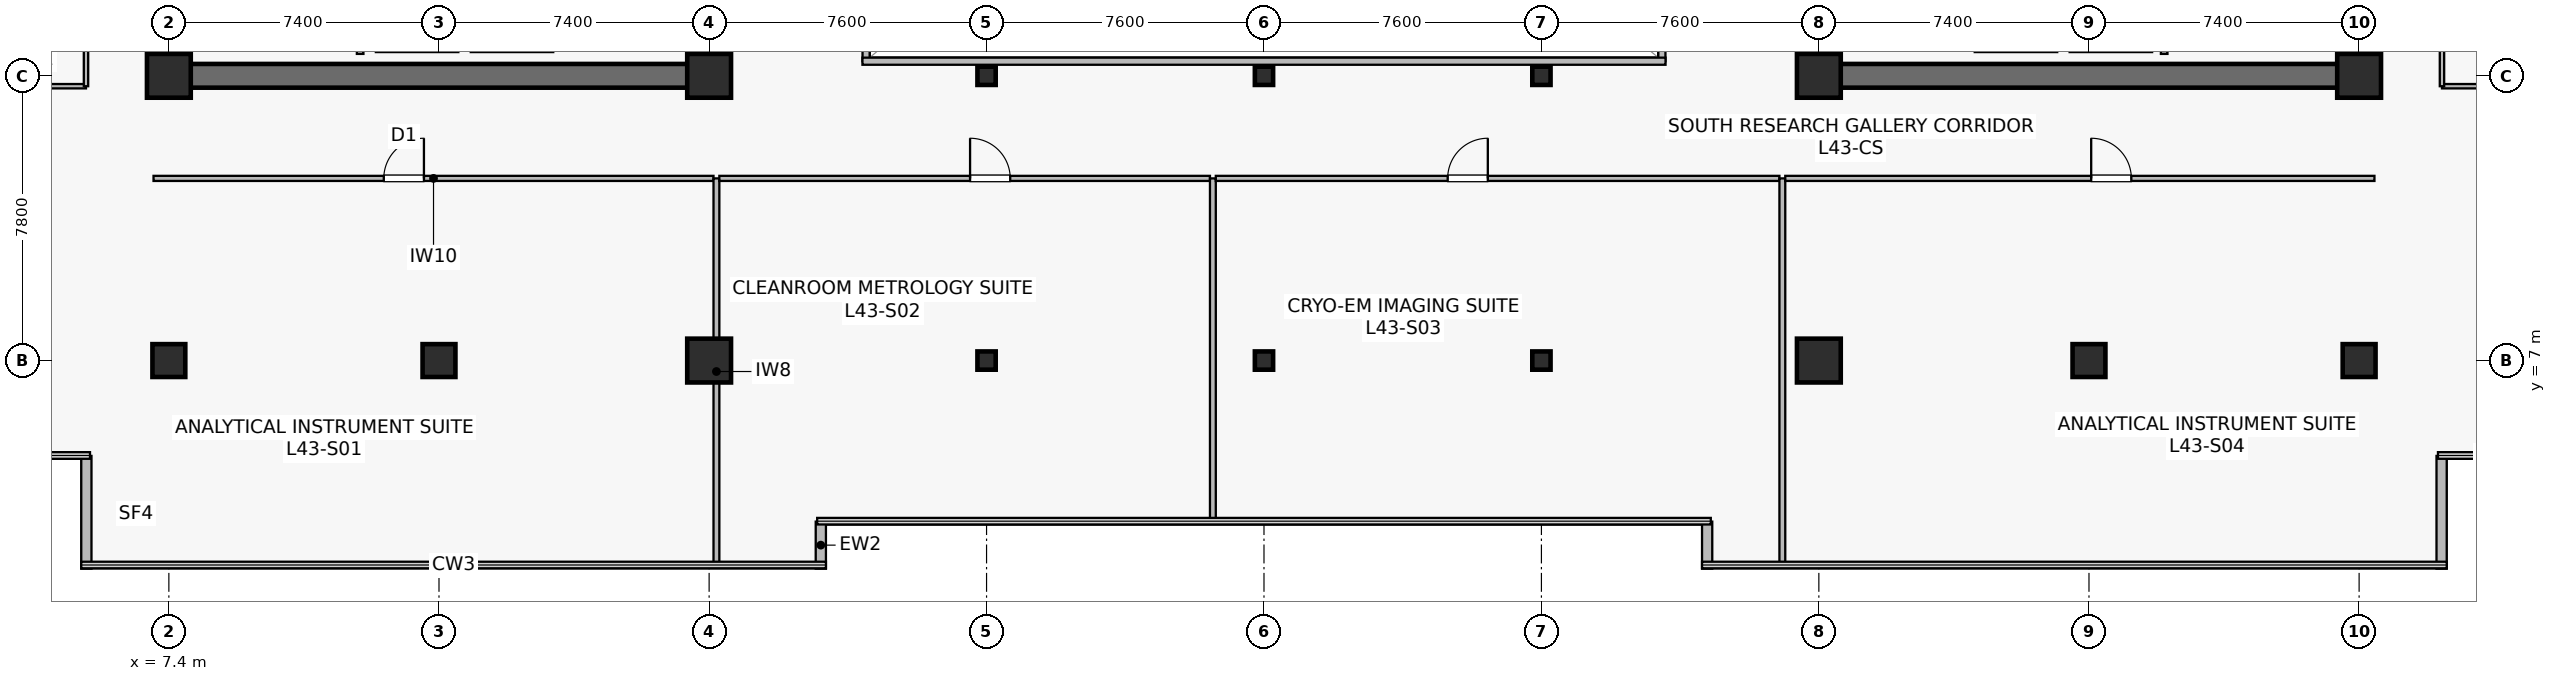
"""IFC4 building model, lengths in metres.
Left out: names, types, materials, properties, quantities, classifications, styles, units other than length and angle.
Written with IfcOpenShell. Run it as: python <this file> out.ifc"""

import sys

from ifc_helpers import new_model, si_unit, direction, frame, frame_2d, origin, origin_2d, place, context, subcontext, project, spatial, rectangle, hollow_rectangle, extrude, source, transform, mapped, element, fill, save


model = new_model("IFC4")
c1 = context("Model", 3, precision=1e-05, world=origin(), true_north=direction((0.0, 1.0)))
c2 = subcontext(c1, "Body", "Model", "MODEL_VIEW")
j1 = project(units=[si_unit("LENGTHUNIT", "METRE"), si_unit("PLANEANGLEUNIT", "RADIAN")], contexts=[c1])
p1 = place(None, origin())
s1 = spatial("IfcSite", under=j1, at=p1, CompositionType="ELEMENT")
p2 = place(p1, origin())
s2 = spatial("IfcBuilding", under=s1, at=p2, CompositionType="ELEMENT")
p3 = place(p2, frame((0.0, 0.0, 178.9)))
s3 = spatial("IfcBuildingStorey", under=s2, at=p3, CompositionType="ELEMENT", Elevation=178.9)
p4 = place(p3, frame((7.075, 14.8, 0.0), z_axis=(0.0, 0.0, 1.0), x_axis=(1.0, 0.0, 0.0)))
e1 = element("IfcWall", 1, at=p4, inside=s3, PredefinedType="SHEAR", context=c2, shape_type="SweptSolid", body=[
    extrude(rectangle(XDim=15.45, YDim=0.65, at=frame_2d((7.725, 0.0))), origin(), (0.0, 0.0, 1.0), 3.79),
])
p5 = place(p3, frame((7.4, 15.125, 0.0), z_axis=(0.0, 0.0, 1.0), x_axis=(0.0, 1.0, 0.0)))
e2 = element("IfcWall", 2, at=p5, inside=s3, PredefinedType="SHEAR", context=c2, shape_type="SweptSolid", body=[
    extrude(rectangle(XDim=18.35, YDim=0.65, at=frame_2d((9.175, 0.0))), origin(), (0.0, 0.0, 1.0), 3.79),
])
p6 = place(p3, frame((22.2, 15.125, 0.0), z_axis=(0.0, 0.0, 1.0), x_axis=(0.0, 1.0, 0.0)))
e3 = element("IfcWall", 3, at=p6, inside=s3, PredefinedType="SHEAR", context=c2, shape_type="SweptSolid", body=[
    extrude(rectangle(XDim=18.35, YDim=0.65, at=frame_2d((9.175, 0.0))), origin(), (0.0, 0.0, 1.0), 3.79),
])
p7 = place(p6, frame((3.425, 0.0, 0.0)))
e4 = element("IfcOpeningElement", 4, at=p7, cuts=e3, PredefinedType="OPENING", context=c2, shape_type="SweptSolid", body=[
    extrude(rectangle(XDim=1.42, YDim=2.2, at=frame_2d((0.71, 1.1))), frame((0.0, 0.335, 0.0), z_axis=(0.0, -1.0, 0.0), x_axis=(1.0, 0.0, 0.0)), (0.0, 0.0, 1.0), 0.67),
])
p8 = place(p3, frame((52.275, 14.8, 0.0), z_axis=(0.0, 0.0, 1.0), x_axis=(1.0, 0.0, 0.0)))
e5 = element("IfcWall", 5, at=p8, inside=s3, PredefinedType="SHEAR", context=c2, shape_type="SweptSolid", body=[
    extrude(rectangle(XDim=15.45, YDim=0.65, at=frame_2d((7.725, 0.0))), origin(), (0.0, 0.0, 1.0), 3.79),
])
p9 = place(p3, frame((52.6, 15.125, 0.0), z_axis=(0.0, 0.0, 1.0), x_axis=(0.0, 1.0, 0.0)))
e6 = element("IfcWall", 6, at=p9, inside=s3, PredefinedType="SHEAR", context=c2, shape_type="SweptSolid", body=[
    extrude(rectangle(XDim=18.35, YDim=0.65, at=frame_2d((9.175, 0.0))), origin(), (0.0, 0.0, 1.0), 3.79),
])
p10 = place(p9, frame((3.425, 0.0, 0.0)))
e7 = element("IfcOpeningElement", 7, at=p10, cuts=e6, PredefinedType="OPENING", context=c2, shape_type="SweptSolid", body=[
    extrude(rectangle(XDim=1.42, YDim=2.2, at=frame_2d((0.71, 1.1))), frame((0.0, 0.335, 0.0), z_axis=(0.0, -1.0, 0.0), x_axis=(1.0, 0.0, 0.0)), (0.0, 0.0, 1.0), 0.67),
])
p11 = place(p3, frame((67.4, 15.125, 0.0), z_axis=(0.0, 0.0, 1.0), x_axis=(0.0, 1.0, 0.0)))
e8 = element("IfcWall", 8, at=p11, inside=s3, PredefinedType="SHEAR", context=c2, shape_type="SweptSolid", body=[
    extrude(rectangle(XDim=18.35, YDim=0.65, at=frame_2d((9.175, 0.0))), origin(), (0.0, 0.0, 1.0), 3.79),
])
m1 = source(origin(), c2, "Body", "SweptSolid", [
    extrude(rectangle(XDim=0.9, YDim=0.9, at=origin_2d()), origin(), (0.0, 0.0, 1.0), 4.1),
])
p12 = place(p3, frame((14.8, 7.0, 0.0), z_axis=(0.0, 0.0, 1.0), x_axis=(1.0, 0.0, 0.0)))
e9 = element("IfcColumn", 9, at=p12, inside=s3, PredefinedType="COLUMN", context=c2, shape_type="MappedRepresentation", body=[
    mapped(m1, transform((0.0, 0.0, 0.0), scale=1.0)),
])
m2 = source(origin(), c2, "Body", "SweptSolid", [
    extrude(rectangle(XDim=1.2, YDim=1.2, at=origin_2d()), origin(), (0.0, 0.0, 1.0), 4.1),
])
for number, where, z_axis, x_axis in (
    (10, (22.2, 7.0, 0.0), (0.0, 0.0, 1.0), (1.0, 0.0, 0.0)),
    (11, (7.4, 14.8, 0.0), (0.0, 0.0, 1.0), (1.0, 0.0, 0.0)),
    (12, (22.2, 14.8, 0.0), (0.0, 0.0, 1.0), (1.0, 0.0, 0.0)),
    (13, (52.6, 7.0, 0.0), (0.0, 0.0, 1.0), (1.0, 0.0, 0.0)),
):
    element("IfcColumn", number, at=place(p3, frame(where, z_axis=z_axis, x_axis=x_axis)), inside=s3, PredefinedType="COLUMN", context=c2, shape_type="MappedRepresentation", body=[
        mapped(m2, transform((0.0, 0.0, 0.0), scale=1.0)),
    ])
p13 = place(p3, frame((60.0, 7.0, 0.0), z_axis=(0.0, 0.0, 1.0), x_axis=(1.0, 0.0, 0.0)))
e14 = element("IfcColumn", 14, at=p13, inside=s3, PredefinedType="COLUMN", context=c2, shape_type="MappedRepresentation", body=[
    mapped(m1, transform((0.0, 0.0, 0.0), scale=1.0)),
])
for number, where, z_axis, x_axis in (
    (15, (52.6, 14.8, 0.0), (0.0, 0.0, 1.0), (1.0, 0.0, 0.0)),
    (16, (67.4, 14.8, 0.0), (0.0, 0.0, 1.0), (1.0, 0.0, 0.0)),
):
    element("IfcColumn", number, at=place(p3, frame(where, z_axis=z_axis, x_axis=x_axis)), inside=s3, PredefinedType="COLUMN", context=c2, shape_type="MappedRepresentation", body=[
        mapped(m2, transform((0.0, 0.0, 0.0), scale=1.0)),
    ])
for number, where, z_axis, x_axis in (
    (17, (7.4, 7.0, 0.0), (0.0, 0.0, 1.0), (1.0, 0.0, 0.0)),
    (18, (67.4, 7.0, 0.0), (0.0, 0.0, 1.0), (1.0, 0.0, 0.0)),
):
    element("IfcColumn", number, at=place(p3, frame(where, z_axis=z_axis, x_axis=x_axis)), inside=s3, PredefinedType="COLUMN", context=c2, shape_type="MappedRepresentation", body=[
        mapped(m1, transform((0.0, 0.0, 0.0), scale=1.0)),
    ])
m3 = source(origin(), c2, "Body", "SweptSolid", [
    extrude(hollow_rectangle(XDim=0.5, YDim=0.5, WallThickness=0.022, at=origin_2d()), origin(), (0.0, 0.0, 1.0), 4.1),
])
for number, where, z_axis, x_axis in (
    (19, (29.8, 7.0, 0.0), (0.0, 0.0, 1.0), (1.0, 0.0, 0.0)),
    (20, (29.8, 14.8, 0.0), (0.0, 0.0, 1.0), (1.0, 0.0, 0.0)),
    (21, (37.4, 7.0, 0.0), (0.0, 0.0, 1.0), (1.0, 0.0, 0.0)),
    (22, (37.4, 14.8, 0.0), (0.0, 0.0, 1.0), (1.0, 0.0, 0.0)),
    (23, (45.0, 7.0, 0.0), (0.0, 0.0, 1.0), (1.0, 0.0, 0.0)),
    (24, (45.0, 14.8, 0.0), (0.0, 0.0, 1.0), (1.0, 0.0, 0.0)),
):
    element("IfcColumn", number, at=place(p3, frame(where, z_axis=z_axis, x_axis=x_axis)), inside=s3, PredefinedType="COLUMN", context=c2, shape_type="MappedRepresentation", body=[
        mapped(m3, transform((0.0, 0.0, 0.0), scale=1.0)),
    ])
for number, where, z_axis, x_axis in (
    (25, (25.26, 1.3, 0.0), (0.0, 0.0, 1.0), (0.0, 1.0, 0.0)),
    (26, (49.54, 2.588, 0.0), (0.0, 0.0, 1.0), (0.0, -1.0, 0.0)),
):
    element("IfcWall", number, at=place(p3, frame(where, z_axis=z_axis, x_axis=x_axis)), inside=s3, PredefinedType="STANDARD", context=c2, shape_type="SweptSolid", body=[
        extrude(rectangle(XDim=1.288, YDim=0.28, at=frame_2d((0.644, 0.0))), origin(), (0.0, 0.0, 1.0), 3.79),
    ])
for number, where, z_axis, x_axis in (
    (27, (69.66, 1.3, 0.0), (0.0, 0.0, 1.0), (0.0, 1.0, 0.0)),
    (28, (5.14, 4.388, 0.0), (0.0, 0.0, 1.0), (0.0, -1.0, 0.0)),
):
    element("IfcWall", number, at=place(p3, frame(where, z_axis=z_axis, x_axis=x_axis)), inside=s3, PredefinedType="STANDARD", context=c2, shape_type="SweptSolid", body=[
        extrude(rectangle(XDim=3.088, YDim=0.28, at=frame_2d((1.544, 0.0))), origin(), (0.0, 0.0, 1.0), 3.79),
    ])
p14 = place(p3, frame((13.07, 15.55, 0.0), z_axis=(0.0, 0.0, 1.0), x_axis=(1.0, 0.0, 0.0)))
e29 = element("IfcWall", 29, at=p14, inside=s3, PredefinedType="SOLIDWALL", context=c2, shape_type="SweptSolid", body=[
    extrude(rectangle(XDim=2.26, YDim=0.2, at=frame_2d((1.13, 0.0))), origin(), (0.0, 0.0, 1.0), 3.187),
])
p15 = place(p3, frame((15.67, 15.55, 0.0), z_axis=(0.0, 0.0, 1.0), x_axis=(1.0, 0.0, 0.0)))
e30 = element("IfcWall", 30, at=p15, inside=s3, PredefinedType="SOLIDWALL", context=c2, shape_type="SweptSolid", body=[
    extrude(rectangle(XDim=2.26, YDim=0.2, at=frame_2d((1.13, 0.0))), origin(), (0.0, 0.0, 1.0), 3.79),
])
p16 = place(p3, frame((12.64, 15.4, 0.0), z_axis=(0.0, 0.0, 1.0), x_axis=(0.0, 1.0, 0.0)))
e31 = element("IfcWall", 31, at=p16, inside=s3, PredefinedType="SOLIDWALL", context=c2, shape_type="SweptSolid", body=[
    extrude(rectangle(XDim=2.4, YDim=0.18, at=frame_2d((1.2, 0.0))), origin(), (0.0, 0.0, 1.0), 3.79),
])
p17 = place(p3, frame((59.47, 15.55, 0.0), z_axis=(0.0, 0.0, 1.0), x_axis=(1.0, 0.0, 0.0)))
e32 = element("IfcWall", 32, at=p17, inside=s3, PredefinedType="SOLIDWALL", context=c2, shape_type="SweptSolid", body=[
    extrude(rectangle(XDim=2.26, YDim=0.2, at=frame_2d((1.13, 0.0))), origin(), (0.0, 0.0, 1.0), 3.187),
])
p18 = place(p3, frame((56.87, 15.55, 0.0), z_axis=(0.0, 0.0, 1.0), x_axis=(1.0, 0.0, 0.0)))
e33 = element("IfcWall", 33, at=p18, inside=s3, PredefinedType="SOLIDWALL", context=c2, shape_type="SweptSolid", body=[
    extrude(rectangle(XDim=2.26, YDim=0.2, at=frame_2d((1.13, 0.0))), origin(), (0.0, 0.0, 1.0), 3.79),
])
p19 = place(p3, frame((62.06, 15.4, 0.0), z_axis=(0.0, 0.0, 1.0), x_axis=(0.0, 1.0, 0.0)))
e34 = element("IfcWall", 34, at=p19, inside=s3, PredefinedType="SOLIDWALL", context=c2, shape_type="SweptSolid", body=[
    extrude(rectangle(XDim=2.4, YDim=0.18, at=frame_2d((1.2, 0.0))), origin(), (0.0, 0.0, 1.0), 3.79),
])
p20 = place(p3, frame((26.5, 15.2, 0.0), z_axis=(0.0, 0.0, 1.0), x_axis=(0.0, 1.0, 0.0)))
e35 = element("IfcWall", 35, at=p20, inside=s3, PredefinedType="SOLIDWALL", context=c2, shape_type="SweptSolid", body=[
    extrude(rectangle(XDim=18.2, YDim=0.195, at=frame_2d((9.1, 0.0))), origin(), (0.0, 0.0, 1.0), 3.79),
])
p21 = place(p20, frame((1.8, 0.0, 0.9)))
e36 = element("IfcOpeningElement", 36, at=p21, cuts=e35, PredefinedType="OPENING", context=c2, shape_type="SweptSolid", body=[
    extrude(rectangle(XDim=1.2, YDim=1.35, at=frame_2d((0.6, 0.675))), frame((0.0, 0.107, 0.0), z_axis=(0.0, -1.0, 0.0), x_axis=(1.0, 0.0, 0.0)), (0.0, 0.0, 1.0), 0.215),
])
p22 = place(p20, frame((13.2, 0.0, 0.9)))
e37 = element("IfcOpeningElement", 37, at=p22, cuts=e35, PredefinedType="OPENING", context=c2, shape_type="SweptSolid", body=[
    extrude(rectangle(XDim=1.2, YDim=1.35, at=frame_2d((0.6, 0.675))), frame((0.0, 0.107, 0.0), z_axis=(0.0, -1.0, 0.0), x_axis=(1.0, 0.0, 0.0)), (0.0, 0.0, 1.0), 0.215),
])
p23 = place(p3, frame((48.3, 15.2, 0.0), z_axis=(0.0, 0.0, 1.0), x_axis=(0.0, 1.0, 0.0)))
e38 = element("IfcWall", 38, at=p23, inside=s3, PredefinedType="SOLIDWALL", context=c2, shape_type="SweptSolid", body=[
    extrude(rectangle(XDim=18.2, YDim=0.195, at=frame_2d((9.1, 0.0))), origin(), (0.0, 0.0, 1.0), 3.79),
])
p24 = place(p23, frame((1.8, 0.0, 0.9)))
e39 = element("IfcOpeningElement", 39, at=p24, cuts=e38, PredefinedType="OPENING", context=c2, shape_type="SweptSolid", body=[
    extrude(rectangle(XDim=1.2, YDim=1.35, at=frame_2d((0.6, 0.675))), frame((0.0, 0.107, 0.0), z_axis=(0.0, -1.0, 0.0), x_axis=(1.0, 0.0, 0.0)), (0.0, 0.0, 1.0), 0.215),
])
p25 = place(p23, frame((13.2, 0.0, 0.9)))
e40 = element("IfcOpeningElement", 40, at=p25, cuts=e38, PredefinedType="OPENING", context=c2, shape_type="SweptSolid", body=[
    extrude(rectangle(XDim=1.2, YDim=1.35, at=frame_2d((0.6, 0.675))), frame((0.0, 0.107, 0.0), z_axis=(0.0, -1.0, 0.0), x_axis=(1.0, 0.0, 0.0)), (0.0, 0.0, 1.0), 0.215),
])
p26 = place(p3, frame((26.4, 15.2, 0.0), z_axis=(0.0, 0.0, 1.0), x_axis=(1.0, 0.0, 0.0)))
e41 = element("IfcWall", 41, at=p26, inside=s3, PredefinedType="SOLIDWALL", context=c2, shape_type="SweptSolid", body=[
    extrude(rectangle(XDim=22.0, YDim=0.195, at=frame_2d((11.0, 0.0))), origin(), (0.0, 0.0, 1.0), 3.79),
])
p27 = place(p3, frame((6.98, 11.99, 0.0), z_axis=(0.0, 0.0, 1.0), x_axis=(1.0, 0.0, 0.0)))
e42 = element("IfcWall", 42, at=p27, inside=s3, PredefinedType="PARTITIONING", context=c2, shape_type="SweptSolid", body=[
    extrude(rectangle(XDim=15.34, YDim=0.14, at=frame_2d((7.67, 0.0))), origin(), (0.0, 0.0, 1.0), 3.187),
])
p28 = place(p27, frame((6.308, 0.0, 0.0)))
e43 = element("IfcOpeningElement", 43, at=p28, cuts=e42, PredefinedType="OPENING", context=c2, shape_type="SweptSolid", body=[
    extrude(rectangle(XDim=1.1, YDim=2.18, at=frame_2d((0.55, 1.09))), frame((0.0, 0.08, 0.0), z_axis=(0.0, -1.0, 0.0), x_axis=(1.0, 0.0, 0.0)), (0.0, 0.0, 1.0), 0.16),
])
p29 = place(p3, frame((22.4, 1.41, 0.0), z_axis=(0.0, 0.0, 1.0), x_axis=(0.0, 1.0, 0.0)))
e44 = element("IfcWall", 44, at=p29, inside=s3, PredefinedType="PARTITIONING", context=c2, shape_type="SweptSolid", body=[
    extrude(rectangle(XDim=10.58, YDim=0.16, at=frame_2d((5.29, 0.0))), origin(), (0.0, 0.0, 1.0), 3.075),
])
p30 = place(p3, frame((22.48, 11.99, 0.0), z_axis=(0.0, 0.0, 1.0), x_axis=(1.0, 0.0, 0.0)))
e45 = element("IfcWall", 45, at=p30, inside=s3, PredefinedType="PARTITIONING", context=c2, shape_type="SweptSolid", body=[
    extrude(rectangle(XDim=13.44, YDim=0.14, at=frame_2d((6.72, 0.0))), origin(), (0.0, 0.0, 1.0), 3.187),
])
p31 = place(p30, frame((6.868, 0.0, 0.0)))
e46 = element("IfcOpeningElement", 46, at=p31, cuts=e45, PredefinedType="OPENING", context=c2, shape_type="SweptSolid", body=[
    extrude(rectangle(XDim=1.1, YDim=2.18, at=frame_2d((0.55, 1.09))), frame((0.0, 0.08, 0.0), z_axis=(0.0, -1.0, 0.0), x_axis=(1.0, 0.0, 0.0)), (0.0, 0.0, 1.0), 0.16),
])
p32 = place(p3, frame((36.0, 2.61, 0.0), z_axis=(0.0, 0.0, 1.0), x_axis=(0.0, 1.0, 0.0)))
e47 = element("IfcWall", 47, at=p32, inside=s3, PredefinedType="PARTITIONING", context=c2, shape_type="SweptSolid", body=[
    extrude(rectangle(XDim=9.38, YDim=0.16, at=frame_2d((4.69, 0.0))), origin(), (0.0, 0.0, 1.0), 3.075),
])
p33 = place(p3, frame((36.08, 11.99, 0.0), z_axis=(0.0, 0.0, 1.0), x_axis=(1.0, 0.0, 0.0)))
e48 = element("IfcWall", 48, at=p33, inside=s3, PredefinedType="PARTITIONING", context=c2, shape_type="SweptSolid", body=[
    extrude(rectangle(XDim=15.44, YDim=0.14, at=frame_2d((7.72, 0.0))), origin(), (0.0, 0.0, 1.0), 3.187),
])
p34 = place(p33, frame((6.352, 0.0, 0.0)))
e49 = element("IfcOpeningElement", 49, at=p34, cuts=e48, PredefinedType="OPENING", context=c2, shape_type="SweptSolid", body=[
    extrude(rectangle(XDim=1.1, YDim=2.18, at=frame_2d((0.55, 1.09))), frame((0.0, 0.08, 0.0), z_axis=(0.0, -1.0, 0.0), x_axis=(1.0, 0.0, 0.0)), (0.0, 0.0, 1.0), 0.16),
])
p35 = place(p3, frame((51.6, 1.41, 0.0), z_axis=(0.0, 0.0, 1.0), x_axis=(0.0, 1.0, 0.0)))
e50 = element("IfcWall", 50, at=p35, inside=s3, PredefinedType="PARTITIONING", context=c2, shape_type="SweptSolid", body=[
    extrude(rectangle(XDim=10.58, YDim=0.16, at=frame_2d((5.29, 0.0))), origin(), (0.0, 0.0, 1.0), 3.075),
])
p36 = place(p3, frame((51.68, 11.99, 0.0), z_axis=(0.0, 0.0, 1.0), x_axis=(1.0, 0.0, 0.0)))
e51 = element("IfcWall", 51, at=p36, inside=s3, PredefinedType="PARTITIONING", context=c2, shape_type="SweptSolid", body=[
    extrude(rectangle(XDim=16.14, YDim=0.14, at=frame_2d((8.07, 0.0))), origin(), (0.0, 0.0, 1.0), 3.187),
])
p37 = place(p36, frame((8.38, 0.0, 0.0)))
e52 = element("IfcOpeningElement", 52, at=p37, cuts=e51, PredefinedType="OPENING", context=c2, shape_type="SweptSolid", body=[
    extrude(rectangle(XDim=1.1, YDim=2.18, at=frame_2d((0.55, 1.09))), frame((0.0, 0.08, 0.0), z_axis=(0.0, -1.0, 0.0), x_axis=(1.0, 0.0, 0.0)), (0.0, 0.0, 1.0), 0.16),
])
p38 = place(p3, frame((2.11, 14.515, 0.0), z_axis=(0.0, 0.0, 1.0), x_axis=(1.0, 0.0, 0.0)))
e53 = element("IfcWall", 53, at=p38, inside=s3, PredefinedType="PARTITIONING", context=c2, shape_type="SweptSolid", body=[
    extrude(rectangle(XDim=3.02, YDim=0.12, at=frame_2d((1.51, 0.0))), origin(), (0.0, 0.0, 1.0), 3.79),
])
p39 = place(p3, frame((5.13, 14.515, 0.0), z_axis=(0.0, 0.0, 1.0), x_axis=(0.0, 1.0, 0.0)))
e54 = element("IfcWall", 54, at=p39, inside=s3, PredefinedType="PARTITIONING", context=c2, shape_type="SweptSolid", body=[
    extrude(rectangle(XDim=5.025, YDim=0.12, at=frame_2d((2.513, 0.0))), origin(), (0.0, 0.0, 1.0), 3.79),
])
p40 = place(p39, frame((2.062, 0.0, 0.0)))
e55 = element("IfcOpeningElement", 55, at=p40, cuts=e54, PredefinedType="OPENING", context=c2, shape_type="SweptSolid", body=[
    extrude(rectangle(XDim=0.9, YDim=2.1, at=frame_2d((0.45, 1.05))), frame((0.0, 0.07, 0.0), z_axis=(0.0, -1.0, 0.0), x_axis=(1.0, 0.0, 0.0)), (0.0, 0.0, 1.0), 0.14),
])
p41 = place(p3, frame((69.67, 14.515, 0.0), z_axis=(0.0, 0.0, 1.0), x_axis=(1.0, 0.0, 0.0)))
e56 = element("IfcWall", 56, at=p41, inside=s3, PredefinedType="PARTITIONING", context=c2, shape_type="SweptSolid", body=[
    extrude(rectangle(XDim=3.02, YDim=0.12, at=frame_2d((1.51, 0.0))), origin(), (0.0, 0.0, 1.0), 3.79),
])
p42 = place(p3, frame((69.67, 14.515, 0.0), z_axis=(0.0, 0.0, 1.0), x_axis=(0.0, 1.0, 0.0)))
e57 = element("IfcWall", 57, at=p42, inside=s3, PredefinedType="PARTITIONING", context=c2, shape_type="SweptSolid", body=[
    extrude(rectangle(XDim=7.425, YDim=0.12, at=frame_2d((3.712, 0.0))), origin(), (0.0, 0.0, 1.0), 3.79),
])
p43 = place(p42, frame((3.262, 0.0, 0.0)))
e58 = element("IfcOpeningElement", 58, at=p43, cuts=e57, PredefinedType="OPENING", context=c2, shape_type="SweptSolid", body=[
    extrude(rectangle(XDim=0.9, YDim=2.1, at=frame_2d((0.45, 1.05))), frame((0.0, 0.07, 0.0), z_axis=(0.0, -1.0, 0.0), x_axis=(1.0, 0.0, 0.0)), (0.0, 0.0, 1.0), 0.14),
])
m4 = source(origin(), c2, "Body", "SweptSolid", [
    extrude(rectangle(XDim=1.1, YDim=2.18, at=frame_2d((0.55, 1.09))), frame((0.0, 0.025, 0.0), z_axis=(0.0, -1.0, 0.0), x_axis=(1.0, 0.0, 0.0)), (0.0, 0.0, 1.0), 0.05),
])
p44 = place(p28, origin())
e59 = element("IfcDoor", 59, at=p44, inside=s3, OperationType="SINGLE_SWING_RIGHT", PredefinedType="DOOR", context=c2, shape_type="MappedRepresentation", body=[
    mapped(m4, transform((0.0, 0.0, 0.0), scale=1.0)),
])
fill(e43, e59)
p45 = place(p31, origin())
e60 = element("IfcDoor", 60, at=p45, inside=s3, OperationType="SINGLE_SWING_LEFT", PredefinedType="DOOR", context=c2, shape_type="MappedRepresentation", body=[
    mapped(m4, transform((0.0, 0.0, 0.0), scale=1.0)),
])
fill(e46, e60)
p46 = place(p34, origin())
e61 = element("IfcDoor", 61, at=p46, inside=s3, OperationType="SINGLE_SWING_RIGHT", PredefinedType="DOOR", context=c2, shape_type="MappedRepresentation", body=[
    mapped(m4, transform((0.0, 0.0, 0.0), scale=1.0)),
])
fill(e49, e61)
p47 = place(p37, origin())
e62 = element("IfcDoor", 62, at=p47, inside=s3, OperationType="SINGLE_SWING_LEFT", PredefinedType="DOOR", context=c2, shape_type="MappedRepresentation", body=[
    mapped(m4, transform((0.0, 0.0, 0.0), scale=1.0)),
])
fill(e52, e62)
save(model, sys.argv[1])
